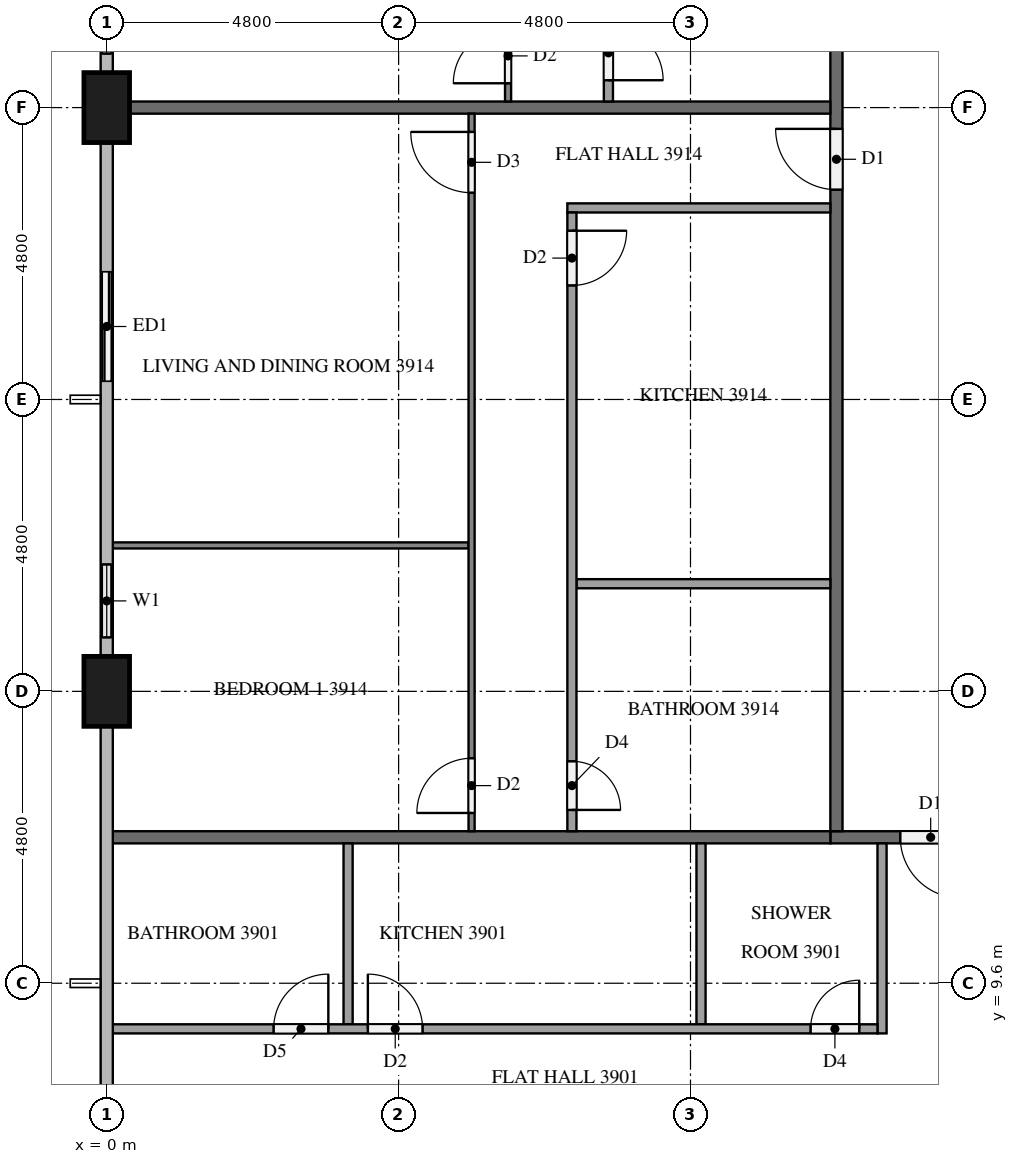
"""IFC4 building model, lengths in metres.
Left out: names, types, materials, properties, quantities, classifications, styles, units other than length and angle.
Written with IfcOpenShell. Run it as: python <this file> out.ifc"""

import sys

from ifc_helpers import new_model, si_unit, direction, frame, frame_2d, origin, origin_2d, place, context, subcontext, project, spatial, rectangle, extrude, element, fill, save


model = new_model("IFC4")
c1 = context("Model", 3, precision=1e-05, world=origin(), true_north=direction((0.0, 1.0)))
c2 = subcontext(c1, "Body", "Model", "MODEL_VIEW")
j1 = project(units=[si_unit("LENGTHUNIT", "METRE"), si_unit("PLANEANGLEUNIT", "RADIAN")], contexts=[c1])
p1 = place(None, origin())
s1 = spatial("IfcSite", under=j1, at=p1, CompositionType="ELEMENT")
p2 = place(p1, origin())
s2 = spatial("IfcBuilding", under=s1, at=p2, CompositionType="ELEMENT")
p3 = place(p2, frame((0.0, 0.0, 152.5)))
s3 = spatial("IfcBuildingStorey", under=s2, at=p3, CompositionType="ELEMENT", Elevation=152.5)
for number, where, z_axis, x_axis in (
    (1, (0.0, 24.0, 0.0), (0.0, 0.0, 1.0), (0.0, 1.0, 0.0)),
    (2, (0.0, 14.4, 0.0), (0.0, 0.0, 1.0), (0.0, 1.0, 0.0)),
):
    element("IfcColumn", number, at=place(p3, frame(where, z_axis=z_axis, x_axis=x_axis)), inside=s3, PredefinedType="COLUMN", context=c2, shape_type="SweptSolid", body=[
        extrude(rectangle(XDim=1.15, YDim=0.75, at=origin_2d()), origin(), (0.0, 0.0, 1.0), 3.2),
    ])
p4 = place(p3, frame((0.0, 26.4, 0.0), z_axis=(0.0, 0.0, 1.0), x_axis=(0.0, -1.0, 0.0)))
e3 = element("IfcWall", 3, at=p4, inside=s3, PredefinedType="SOLIDWALL", context=c2, shape_type="SweptSolid", body=[
    extrude(rectangle(XDim=1.825, YDim=0.15, at=frame_2d((0.913, 0.0))), origin(), (0.0, 0.0, 1.0), 3.2),
])
p5 = place(p4, frame((0.312, 0.0, 0.9)))
e4 = element("IfcOpeningElement", 4, at=p5, cuts=e3, PredefinedType="OPENING", context=c2, shape_type="SweptSolid", body=[
    extrude(rectangle(XDim=1.2, YDim=1.4, at=frame_2d((0.6, 0.7))), frame((0.0, 0.085, 0.0), z_axis=(0.0, -1.0, 0.0), x_axis=(1.0, 0.0, 0.0)), (0.0, 0.0, 1.0), 0.17),
])
p6 = place(p3, frame((0.0, 21.6, 0.0), z_axis=(0.0, 0.0, 1.0), x_axis=(0.0, -1.0, 0.0)))
e5 = element("IfcWall", 5, at=p6, inside=s3, PredefinedType="SOLIDWALL", context=c2, shape_type="SweptSolid", body=[
    extrude(rectangle(XDim=2.4, YDim=0.15, at=frame_2d((1.2, 0.0))), origin(), (0.0, 0.0, 1.0), 3.2),
])
p7 = place(p6, frame((0.3, 0.0, 0.0)))
e6 = element("IfcOpeningElement", 6, at=p7, cuts=e5, PredefinedType="OPENING", context=c2, shape_type="SweptSolid", body=[
    extrude(rectangle(XDim=1.8, YDim=2.4, at=frame_2d((0.9, 1.2))), frame((0.0, 0.085, 0.0), z_axis=(0.0, -1.0, 0.0), x_axis=(1.0, 0.0, 0.0)), (0.0, 0.0, 1.0), 0.17),
])
p8 = place(p3, frame((0.0, 16.8, 0.0), z_axis=(0.0, 0.0, 1.0), x_axis=(0.0, -1.0, 0.0)))
e7 = element("IfcWall", 7, at=p8, inside=s3, PredefinedType="SOLIDWALL", context=c2, shape_type="SweptSolid", body=[
    extrude(rectangle(XDim=1.825, YDim=0.15, at=frame_2d((0.913, 0.0))), origin(), (0.0, 0.0, 1.0), 3.2),
])
p9 = place(p8, frame((0.312, 0.0, 0.9)))
e8 = element("IfcOpeningElement", 8, at=p9, cuts=e7, PredefinedType="OPENING", context=c2, shape_type="SweptSolid", body=[
    extrude(rectangle(XDim=1.2, YDim=1.4, at=frame_2d((0.6, 0.7))), frame((0.0, 0.085, 0.0), z_axis=(0.0, -1.0, 0.0), x_axis=(1.0, 0.0, 0.0)), (0.0, 0.0, 1.0), 0.17),
])
p10 = place(p3, frame((50.5, 12.0, 0.0), z_axis=(0.0, 0.0, 1.0), x_axis=(-1.0, 0.0, 0.0)))
e9 = element("IfcWall", 9, at=p10, inside=s3, PredefinedType="PARTITIONING", context=c2, shape_type="SweptSolid", body=[
    extrude(rectangle(XDim=38.6, YDim=0.2, at=frame_2d((19.3, 0.0))), origin(), (0.0, 0.0, 1.0), 3.2),
])
p11 = place(p10, frame((36.45, 0.0, 0.0)))
e10 = element("IfcOpeningElement", 10, at=p11, cuts=e9, PredefinedType="OPENING", context=c2, shape_type="SweptSolid", body=[
    extrude(rectangle(XDim=1.0, YDim=2.1, at=frame_2d((0.5, 1.05))), frame((0.0, 0.11, 0.0), z_axis=(0.0, -1.0, 0.0), x_axis=(1.0, 0.0, 0.0)), (0.0, 0.0, 1.0), 0.22),
])
p12 = place(p10, frame((34.75, 0.0, 0.0)))
e11 = element("IfcOpeningElement", 11, at=p12, cuts=e9, PredefinedType="OPENING", context=c2, shape_type="SweptSolid", body=[
    extrude(rectangle(XDim=1.0, YDim=2.1, at=frame_2d((0.5, 1.05))), frame((0.0, 0.11, 0.0), z_axis=(0.0, -1.0, 0.0), x_axis=(1.0, 0.0, 0.0)), (0.0, 0.0, 1.0), 0.22),
])
p13 = place(p10, frame((10.05, 0.0, 0.0)))
e12 = element("IfcOpeningElement", 12, at=p13, cuts=e9, PredefinedType="OPENING", context=c2, shape_type="SweptSolid", body=[
    extrude(rectangle(XDim=1.0, YDim=2.1, at=frame_2d((0.5, 1.05))), frame((0.0, 0.11, 0.0), z_axis=(0.0, -1.0, 0.0), x_axis=(1.0, 0.0, 0.0)), (0.0, 0.0, 1.0), 0.22),
])
p14 = place(p10, frame((8.35, 0.0, 0.0)))
e13 = element("IfcOpeningElement", 13, at=p14, cuts=e9, PredefinedType="OPENING", context=c2, shape_type="SweptSolid", body=[
    extrude(rectangle(XDim=1.0, YDim=2.1, at=frame_2d((0.5, 1.05))), frame((0.0, 0.11, 0.0), z_axis=(0.0, -1.0, 0.0), x_axis=(1.0, 0.0, 0.0)), (0.0, 0.0, 1.0), 0.22),
])
p15 = place(p3, frame((12.0, 12.1, 0.0), z_axis=(0.0, 0.0, 1.0), x_axis=(0.0, 1.0, 0.0)))
e14 = element("IfcWall", 14, at=p15, inside=s3, PredefinedType="PARTITIONING", context=c2, shape_type="SweptSolid", body=[
    extrude(rectangle(XDim=28.6, YDim=0.2, at=frame_2d((14.3, 0.0))), origin(), (0.0, 0.0, 1.0), 3.2),
])
p16 = place(p15, frame((27.35, 0.0, 0.0)))
e15 = element("IfcOpeningElement", 15, at=p16, cuts=e14, PredefinedType="OPENING", context=c2, shape_type="SweptSolid", body=[
    extrude(rectangle(XDim=1.0, YDim=2.1, at=frame_2d((0.5, 1.05))), frame((0.0, 0.11, 0.0), z_axis=(0.0, -1.0, 0.0), x_axis=(1.0, 0.0, 0.0)), (0.0, 0.0, 1.0), 0.22),
])
p17 = place(p15, frame((20.15, 0.0, 0.0)))
e16 = element("IfcOpeningElement", 16, at=p17, cuts=e14, PredefinedType="OPENING", context=c2, shape_type="SweptSolid", body=[
    extrude(rectangle(XDim=1.0, YDim=2.1, at=frame_2d((0.5, 1.05))), frame((0.0, 0.11, 0.0), z_axis=(0.0, -1.0, 0.0), x_axis=(1.0, 0.0, 0.0)), (0.0, 0.0, 1.0), 0.22),
])
p18 = place(p15, frame((10.55, 0.0, 0.0)))
e17 = element("IfcOpeningElement", 17, at=p18, cuts=e14, PredefinedType="OPENING", context=c2, shape_type="SweptSolid", body=[
    extrude(rectangle(XDim=1.0, YDim=2.1, at=frame_2d((0.5, 1.05))), frame((0.0, 0.11, 0.0), z_axis=(0.0, -1.0, 0.0), x_axis=(1.0, 0.0, 0.0)), (0.0, 0.0, 1.0), 0.22),
])
p19 = place(p3, frame((0.1, 12.0, 0.0), z_axis=(0.0, 0.0, 1.0), x_axis=(1.0, 0.0, 0.0)))
e18 = element("IfcWall", 18, at=p19, inside=s3, PredefinedType="PARTITIONING", context=c2, shape_type="SweptSolid", body=[
    extrude(rectangle(XDim=11.8, YDim=0.2, at=frame_2d((5.9, 0.0))), origin(), (0.0, 0.0, 1.0), 3.2),
])
p20 = place(p3, frame((0.375, 24.0, 0.0), z_axis=(0.0, 0.0, 1.0), x_axis=(1.0, 0.0, 0.0)))
e19 = element("IfcWall", 19, at=p20, inside=s3, PredefinedType="PARTITIONING", context=c2, shape_type="SweptSolid", body=[
    extrude(rectangle(XDim=11.525, YDim=0.2, at=frame_2d((5.762, 0.0))), origin(), (0.0, 0.0, 1.0), 3.2),
])
for number, where, z_axis, x_axis in (
    (20, (9.773, 11.9, 0.0), (0.0, 0.0, 1.0), (0.0, -1.0, 0.0)),
    (21, (3.969, 11.9, 0.0), (0.0, 0.0, 1.0), (0.0, -1.0, 0.0)),
):
    element("IfcWall", number, at=place(p3, frame(where, z_axis=z_axis, x_axis=x_axis)), inside=s3, PredefinedType="PARTITIONING", context=c2, shape_type="SweptSolid", body=[
        extrude(rectangle(XDim=2.975, YDim=0.15, at=frame_2d((1.487, 0.0))), origin(), (0.0, 0.0, 1.0), 3.2),
    ])
p21 = place(p3, frame((12.75, 11.9, 0.0), z_axis=(0.0, 0.0, 1.0), x_axis=(0.0, -1.0, 0.0)))
e22 = element("IfcWall", 22, at=p21, inside=s3, PredefinedType="PARTITIONING", context=c2, shape_type="SweptSolid", body=[
    extrude(rectangle(XDim=3.125, YDim=0.15, at=frame_2d((1.562, 0.0))), origin(), (0.0, 0.0, 1.0), 3.2),
])
p22 = place(p3, frame((0.1, 8.85, 0.0), z_axis=(0.0, 0.0, 1.0), x_axis=(1.0, 0.0, 0.0)))
e23 = element("IfcWall", 23, at=p22, inside=s3, PredefinedType="PARTITIONING", context=c2, shape_type="SweptSolid", body=[
    extrude(rectangle(XDim=12.575, YDim=0.15, at=frame_2d((6.288, 0.0))), origin(), (0.0, 0.0, 1.0), 3.2),
])
p23 = place(p22, frame((11.475, 0.0, 0.0)))
e24 = element("IfcOpeningElement", 24, at=p23, cuts=e23, PredefinedType="OPENING", context=c2, shape_type="SweptSolid", body=[
    extrude(rectangle(XDim=0.8, YDim=2.1, at=frame_2d((0.4, 1.05))), frame((0.0, 0.085, 0.0), z_axis=(0.0, -1.0, 0.0), x_axis=(1.0, 0.0, 0.0)), (0.0, 0.0, 1.0), 0.17),
])
p24 = place(p22, frame((4.194, 0.0, 0.0)))
e25 = element("IfcOpeningElement", 25, at=p24, cuts=e23, PredefinedType="OPENING", context=c2, shape_type="SweptSolid", body=[
    extrude(rectangle(XDim=0.9, YDim=2.1, at=frame_2d((0.45, 1.05))), frame((0.0, 0.085, 0.0), z_axis=(0.0, -1.0, 0.0), x_axis=(1.0, 0.0, 0.0)), (0.0, 0.0, 1.0), 0.17),
])
p25 = place(p22, frame((2.644, 0.0, 0.0)))
e26 = element("IfcOpeningElement", 26, at=p25, cuts=e23, PredefinedType="OPENING", context=c2, shape_type="SweptSolid", body=[
    extrude(rectangle(XDim=0.9, YDim=2.1, at=frame_2d((0.45, 1.05))), frame((0.0, 0.085, 0.0), z_axis=(0.0, -1.0, 0.0), x_axis=(1.0, 0.0, 0.0)), (0.0, 0.0, 1.0), 0.17),
])
p26 = place(p3, frame((6.6, 24.1, 0.0), z_axis=(0.0, 0.0, 1.0), x_axis=(0.0, 1.0, 0.0)))
e27 = element("IfcWall", 27, at=p26, inside=s3, PredefinedType="PARTITIONING", context=c2, shape_type="SweptSolid", body=[
    extrude(rectangle(XDim=9.4, YDim=0.1, at=frame_2d((4.7, 0.0))), origin(), (0.0, 0.0, 1.0), 3.2),
])
p27 = place(p26, frame((8.1, 0.0, 0.0)))
e28 = element("IfcOpeningElement", 28, at=p27, cuts=e27, PredefinedType="OPENING", context=c2, shape_type="SweptSolid", body=[
    extrude(rectangle(XDim=1.0, YDim=2.1, at=frame_2d((0.5, 1.05))), frame((0.0, 0.06, 0.0), z_axis=(0.0, -1.0, 0.0), x_axis=(1.0, 0.0, 0.0)), (0.0, 0.0, 1.0), 0.12),
])
p28 = place(p26, frame((0.3, 0.0, 0.0)))
e29 = element("IfcOpeningElement", 29, at=p28, cuts=e27, PredefinedType="OPENING", context=c2, shape_type="SweptSolid", body=[
    extrude(rectangle(XDim=0.9, YDim=2.1, at=frame_2d((0.45, 1.05))), frame((0.0, 0.06, 0.0), z_axis=(0.0, -1.0, 0.0), x_axis=(1.0, 0.0, 0.0)), (0.0, 0.0, 1.0), 0.12),
])
p29 = place(p3, frame((8.25, 31.875, 0.0), z_axis=(0.0, 0.0, 1.0), x_axis=(0.0, -1.0, 0.0)))
e30 = element("IfcWall", 30, at=p29, inside=s3, PredefinedType="PARTITIONING", context=c2, shape_type="SweptSolid", body=[
    extrude(rectangle(XDim=7.775, YDim=0.15, at=frame_2d((3.887, 0.0))), origin(), (0.0, 0.0, 1.0), 3.2),
])
p30 = place(p29, frame((0.3, 0.0, 0.0)))
e31 = element("IfcOpeningElement", 31, at=p30, cuts=e30, PredefinedType="OPENING", context=c2, shape_type="SweptSolid", body=[
    extrude(rectangle(XDim=0.8, YDim=2.1, at=frame_2d((0.4, 1.05))), frame((0.0, 0.085, 0.0), z_axis=(0.0, -1.0, 0.0), x_axis=(1.0, 0.0, 0.0)), (0.0, 0.0, 1.0), 0.17),
])
p31 = place(p29, frame((6.525, 0.0, 0.0)))
e32 = element("IfcOpeningElement", 32, at=p31, cuts=e30, PredefinedType="OPENING", context=c2, shape_type="SweptSolid", body=[
    extrude(rectangle(XDim=0.9, YDim=2.1, at=frame_2d((0.45, 1.05))), frame((0.0, 0.085, 0.0), z_axis=(0.0, -1.0, 0.0), x_axis=(1.0, 0.0, 0.0)), (0.0, 0.0, 1.0), 0.17),
])
p32 = place(p3, frame((5.95, 16.8, 0.0), z_axis=(0.0, 0.0, 1.0), x_axis=(-1.0, 0.0, 0.0)))
e33 = element("IfcWall", 33, at=p32, inside=s3, PredefinedType="PARTITIONING", context=c2, shape_type="SweptSolid", body=[
    extrude(rectangle(XDim=5.85, YDim=0.1, at=frame_2d((2.925, 0.0))), origin(), (0.0, 0.0, 1.0), 3.2),
])
p33 = place(p3, frame((6.0, 12.1, 0.0), z_axis=(0.0, 0.0, 1.0), x_axis=(0.0, 1.0, 0.0)))
e34 = element("IfcWall", 34, at=p33, inside=s3, PredefinedType="PARTITIONING", context=c2, shape_type="SweptSolid", body=[
    extrude(rectangle(XDim=11.8, YDim=0.1, at=frame_2d((5.9, 0.0))), origin(), (0.0, 0.0, 1.0), 3.2),
])
p34 = place(p33, frame((10.5, 0.0, 0.0)))
e35 = element("IfcOpeningElement", 35, at=p34, cuts=e34, PredefinedType="OPENING", context=c2, shape_type="SweptSolid", body=[
    extrude(rectangle(XDim=1.0, YDim=2.1, at=frame_2d((0.5, 1.05))), frame((0.0, 0.06, 0.0), z_axis=(0.0, -1.0, 0.0), x_axis=(1.0, 0.0, 0.0)), (0.0, 0.0, 1.0), 0.12),
])
p35 = place(p33, frame((0.3, 0.0, 0.0)))
e36 = element("IfcOpeningElement", 36, at=p35, cuts=e34, PredefinedType="OPENING", context=c2, shape_type="SweptSolid", body=[
    extrude(rectangle(XDim=0.9, YDim=2.1, at=frame_2d((0.45, 1.05))), frame((0.0, 0.06, 0.0), z_axis=(0.0, -1.0, 0.0), x_axis=(1.0, 0.0, 0.0)), (0.0, 0.0, 1.0), 0.12),
])
p36 = place(p3, frame((11.9, 16.17, 0.0), z_axis=(0.0, 0.0, 1.0), x_axis=(-1.0, 0.0, 0.0)))
e37 = element("IfcWall", 37, at=p36, inside=s3, PredefinedType="PARTITIONING", context=c2, shape_type="SweptSolid", body=[
    extrude(rectangle(XDim=4.175, YDim=0.15, at=frame_2d((2.087, 0.0))), origin(), (0.0, 0.0, 1.0), 3.2),
])
p37 = place(p3, frame((11.9, 22.35, 0.0), z_axis=(0.0, 0.0, 1.0), x_axis=(-1.0, 0.0, 0.0)))
e38 = element("IfcWall", 38, at=p37, inside=s3, PredefinedType="PARTITIONING", context=c2, shape_type="SweptSolid", body=[
    extrude(rectangle(XDim=4.325, YDim=0.15, at=frame_2d((2.163, 0.0))), origin(), (0.0, 0.0, 1.0), 3.2),
])
p38 = place(p3, frame((7.65, 22.275, 0.0), z_axis=(0.0, 0.0, 1.0), x_axis=(0.0, -1.0, 0.0)))
e39 = element("IfcWall", 39, at=p38, inside=s3, PredefinedType="PARTITIONING", context=c2, shape_type="SweptSolid", body=[
    extrude(rectangle(XDim=10.175, YDim=0.15, at=frame_2d((5.087, 0.0))), origin(), (0.0, 0.0, 1.0), 3.2),
])
p39 = place(p38, frame((0.3, 0.0, 0.0)))
e40 = element("IfcOpeningElement", 40, at=p39, cuts=e39, PredefinedType="OPENING", context=c2, shape_type="SweptSolid", body=[
    extrude(rectangle(XDim=0.9, YDim=2.1, at=frame_2d((0.45, 1.05))), frame((0.0, 0.085, 0.0), z_axis=(0.0, -1.0, 0.0), x_axis=(1.0, 0.0, 0.0)), (0.0, 0.0, 1.0), 0.17),
])
p40 = place(p38, frame((9.025, 0.0, 0.0)))
e41 = element("IfcOpeningElement", 41, at=p40, cuts=e39, PredefinedType="OPENING", context=c2, shape_type="SweptSolid", body=[
    extrude(rectangle(XDim=0.8, YDim=2.1, at=frame_2d((0.4, 1.05))), frame((0.0, 0.085, 0.0), z_axis=(0.0, -1.0, 0.0), x_axis=(1.0, 0.0, 0.0)), (0.0, 0.0, 1.0), 0.17),
])
p41 = place(p5, origin())
e42 = element("IfcWindow", 42, at=p41, inside=s3, PartitioningType="SINGLE_PANEL", PredefinedType="WINDOW", context=c2, shape_type="SweptSolid", body=[
    extrude(rectangle(XDim=1.2, YDim=1.4, at=frame_2d((0.6, 0.7))), frame((0.0, 0.03, 0.0), z_axis=(0.0, -1.0, 0.0), x_axis=(1.0, 0.0, 0.0)), (0.0, 0.0, 1.0), 0.06),
])
fill(e4, e42)
p42 = place(p7, origin())
e43 = element("IfcDoor", 43, at=p42, inside=s3, OperationType="SLIDING_TO_LEFT", PredefinedType="DOOR", context=c2, shape_type="SweptSolid", body=[
    extrude(rectangle(XDim=1.8, YDim=2.4, at=frame_2d((0.9, 1.2))), frame((0.0, 0.025, 0.0), z_axis=(0.0, -1.0, 0.0), x_axis=(1.0, 0.0, 0.0)), (0.0, 0.0, 1.0), 0.05),
])
fill(e6, e43)
p43 = place(p9, origin())
e44 = element("IfcWindow", 44, at=p43, inside=s3, PartitioningType="SINGLE_PANEL", PredefinedType="WINDOW", context=c2, shape_type="SweptSolid", body=[
    extrude(rectangle(XDim=1.2, YDim=1.4, at=frame_2d((0.6, 0.7))), frame((0.0, 0.03, 0.0), z_axis=(0.0, -1.0, 0.0), x_axis=(1.0, 0.0, 0.0)), (0.0, 0.0, 1.0), 0.06),
])
fill(e8, e44)
p44 = place(p11, origin())
e45 = element("IfcDoor", 45, at=p44, inside=s3, OperationType="SINGLE_SWING_LEFT", PredefinedType="DOOR", context=c2, shape_type="SweptSolid", body=[
    extrude(rectangle(XDim=1.0, YDim=2.1, at=frame_2d((0.5, 1.05))), frame((0.0, 0.025, 0.0), z_axis=(0.0, -1.0, 0.0), x_axis=(1.0, 0.0, 0.0)), (0.0, 0.0, 1.0), 0.05),
])
fill(e10, e45)
p45 = place(p18, origin())
e46 = element("IfcDoor", 46, at=p45, inside=s3, OperationType="SINGLE_SWING_RIGHT", PredefinedType="DOOR", context=c2, shape_type="SweptSolid", body=[
    extrude(rectangle(XDim=1.0, YDim=2.1, at=frame_2d((0.5, 1.05))), frame((0.0, 0.025, 0.0), z_axis=(0.0, -1.0, 0.0), x_axis=(1.0, 0.0, 0.0)), (0.0, 0.0, 1.0), 0.05),
])
fill(e17, e46)
p46 = place(p23, origin())
e47 = element("IfcDoor", 47, at=p46, inside=s3, OperationType="SINGLE_SWING_RIGHT", PredefinedType="DOOR", context=c2, shape_type="SweptSolid", body=[
    extrude(rectangle(XDim=0.8, YDim=2.1, at=frame_2d((0.4, 1.05))), frame((0.0, 0.025, 0.0), z_axis=(0.0, -1.0, 0.0), x_axis=(1.0, 0.0, 0.0)), (0.0, 0.0, 1.0), 0.05),
])
fill(e24, e47)
p47 = place(p24, origin())
e48 = element("IfcDoor", 48, at=p47, inside=s3, OperationType="SINGLE_SWING_LEFT", PredefinedType="DOOR", context=c2, shape_type="SweptSolid", body=[
    extrude(rectangle(XDim=0.9, YDim=2.1, at=frame_2d((0.45, 1.05))), frame((0.0, 0.025, 0.0), z_axis=(0.0, -1.0, 0.0), x_axis=(1.0, 0.0, 0.0)), (0.0, 0.0, 1.0), 0.05),
])
fill(e25, e48)
p48 = place(p25, origin())
e49 = element("IfcDoor", 49, at=p48, inside=s3, OperationType="SINGLE_SWING_RIGHT", PredefinedType="DOOR", context=c2, shape_type="SweptSolid", body=[
    extrude(rectangle(XDim=0.9, YDim=2.1, at=frame_2d((0.45, 1.05))), frame((0.0, 0.025, 0.0), z_axis=(0.0, -1.0, 0.0), x_axis=(1.0, 0.0, 0.0)), (0.0, 0.0, 1.0), 0.05),
])
fill(e26, e49)
p49 = place(p28, origin())
e50 = element("IfcDoor", 50, at=p49, inside=s3, OperationType="SINGLE_SWING_LEFT", PredefinedType="DOOR", context=c2, shape_type="SweptSolid", body=[
    extrude(rectangle(XDim=0.9, YDim=2.1, at=frame_2d((0.45, 1.05))), frame((0.0, 0.025, 0.0), z_axis=(0.0, -1.0, 0.0), x_axis=(1.0, 0.0, 0.0)), (0.0, 0.0, 1.0), 0.05),
])
fill(e29, e50)
p50 = place(p31, origin())
e51 = element("IfcDoor", 51, at=p50, inside=s3, OperationType="SINGLE_SWING_RIGHT", PredefinedType="DOOR", context=c2, shape_type="SweptSolid", body=[
    extrude(rectangle(XDim=0.9, YDim=2.1, at=frame_2d((0.45, 1.05))), frame((0.0, 0.025, 0.0), z_axis=(0.0, -1.0, 0.0), x_axis=(1.0, 0.0, 0.0)), (0.0, 0.0, 1.0), 0.05),
])
fill(e32, e51)
p51 = place(p34, origin())
e52 = element("IfcDoor", 52, at=p51, inside=s3, OperationType="SINGLE_SWING_RIGHT", PredefinedType="DOOR", context=c2, shape_type="SweptSolid", body=[
    extrude(rectangle(XDim=1.0, YDim=2.1, at=frame_2d((0.5, 1.05))), frame((0.0, 0.025, 0.0), z_axis=(0.0, -1.0, 0.0), x_axis=(1.0, 0.0, 0.0)), (0.0, 0.0, 1.0), 0.05),
])
fill(e35, e52)
p52 = place(p35, origin())
e53 = element("IfcDoor", 53, at=p52, inside=s3, OperationType="SINGLE_SWING_LEFT", PredefinedType="DOOR", context=c2, shape_type="SweptSolid", body=[
    extrude(rectangle(XDim=0.9, YDim=2.1, at=frame_2d((0.45, 1.05))), frame((0.0, 0.025, 0.0), z_axis=(0.0, -1.0, 0.0), x_axis=(1.0, 0.0, 0.0)), (0.0, 0.0, 1.0), 0.05),
])
fill(e36, e53)
p53 = place(p39, origin())
e54 = element("IfcDoor", 54, at=p53, inside=s3, OperationType="SINGLE_SWING_LEFT", PredefinedType="DOOR", context=c2, shape_type="SweptSolid", body=[
    extrude(rectangle(XDim=0.9, YDim=2.1, at=frame_2d((0.45, 1.05))), frame((0.0, 0.025, 0.0), z_axis=(0.0, -1.0, 0.0), x_axis=(1.0, 0.0, 0.0)), (0.0, 0.0, 1.0), 0.05),
])
fill(e40, e54)
p54 = place(p40, origin())
e55 = element("IfcDoor", 55, at=p54, inside=s3, OperationType="SINGLE_SWING_RIGHT", PredefinedType="DOOR", context=c2, shape_type="SweptSolid", body=[
    extrude(rectangle(XDim=0.8, YDim=2.1, at=frame_2d((0.4, 1.05))), frame((0.0, 0.025, 0.0), z_axis=(0.0, -1.0, 0.0), x_axis=(1.0, 0.0, 0.0)), (0.0, 0.0, 1.0), 0.05),
])
fill(e41, e55)
save(model, sys.argv[1])
